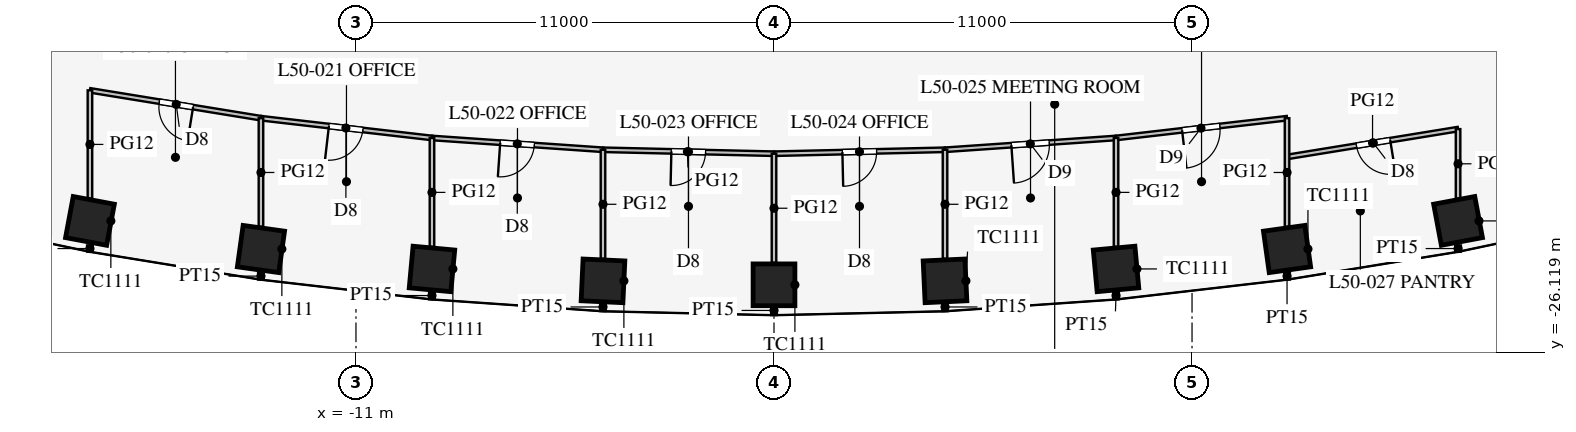
"""IFC4 building model, lengths in metres.
Left out: names, types, materials, properties, quantities, classifications, styles, units other than length and angle.
Written with IfcOpenShell. Run it as: python <this file> out.ifc"""

import sys

from ifc_helpers import new_model, si_unit, direction, frame, frame_2d, origin, origin_2d, place, context, subcontext, project, spatial, rectangle, extrude, element, fill, save


model = new_model("IFC4")
c1 = context("Model", 3, precision=1e-05, world=origin(), true_north=direction((0.0, 1.0)))
c2 = subcontext(c1, "Body", "Model", "MODEL_VIEW")
j1 = project(units=[si_unit("LENGTHUNIT", "METRE"), si_unit("PLANEANGLEUNIT", "RADIAN")], contexts=[c1])
p1 = place(None, origin())
s1 = spatial("IfcSite", under=j1, at=p1, CompositionType="ELEMENT")
p2 = place(p1, origin())
s2 = spatial("IfcBuilding", under=s1, at=p2, CompositionType="ELEMENT")
p3 = place(p2, frame((0.0, 0.0, 219.1)))
s3 = spatial("IfcBuildingStorey", under=s2, at=p3, CompositionType="ELEMENT", Elevation=219.1)
for number, where, z_axis, x_axis in (
    (1, (-18.0, -22.669, 0.0), (0.0, 0.0, 1.0), (0.983, -0.184, 0.0)),
    (2, (-13.5, -23.408, 0.0), (0.0, 0.0, 1.0), (0.99, -0.138, 0.0)),
    (3, (-9.0, -23.933, 0.0), (0.0, 0.0, 1.0), (0.996, -0.092, 0.0)),
    (4, (-4.5, -24.246, 0.0), (0.0, 0.0, 1.0), (0.999, -0.046, 0.0)),
    (5, (0.0, -24.351, 0.0), (0.0, 0.0, 1.0), (1.0, 0.0, 0.0)),
    (6, (4.5, -24.246, 0.0), (0.0, 0.0, 1.0), (0.999, 0.046, 0.0)),
    (7, (9.0, -23.933, 0.0), (0.0, 0.0, 1.0), (0.996, 0.092, 0.0)),
    (8, (13.5, -23.408, 0.0), (0.0, 0.0, 1.0), (0.99, 0.138, 0.0)),
    (9, (18.0, -22.669, 0.0), (0.0, 0.0, 1.0), (0.983, 0.184, 0.0)),
):
    element("IfcColumn", number, at=place(p3, frame(where, z_axis=z_axis, x_axis=x_axis)), inside=s3, PredefinedType="COLUMN", context=c2, shape_type="SweptSolid", body=[
        extrude(rectangle(XDim=1.1, YDim=1.1, at=origin_2d()), origin(), (0.0, 0.0, 1.0), 4.2),
    ])
p4 = place(p3, frame((13.5, -24.033, 0.0), z_axis=(0.0, 0.0, 1.0), x_axis=(0.0, -1.0, 0.0)))
e10 = element("IfcWall", 10, at=p4, inside=s3, PredefinedType="PARTITIONING", context=c2, shape_type="SweptSolid", body=[
    extrude(rectangle(XDim=0.178, YDim=0.15, at=frame_2d((0.089, 0.0))), origin(), (0.0, 0.0, 1.0), 2.9),
])
p5 = place(p3, frame((18.0, -23.315, 0.0), z_axis=(0.0, 0.0, 1.0), x_axis=(0.0, -1.0, 0.0)))
e11 = element("IfcWall", 11, at=p5, inside=s3, PredefinedType="PARTITIONING", context=c2, shape_type="SweptSolid", body=[
    extrude(rectangle(XDim=0.163, YDim=0.15, at=frame_2d((0.082, 0.0))), origin(), (0.0, 0.0, 1.0), 2.9),
])
p6 = place(p3, frame((4.5, -24.825, 0.0), z_axis=(0.0, 0.0, 1.0), x_axis=(0.0, -1.0, 0.0)))
e12 = element("IfcWall", 12, at=p6, inside=s3, PredefinedType="PARTITIONING", context=c2, shape_type="SweptSolid", body=[
    extrude(rectangle(XDim=0.217, YDim=0.15, at=frame_2d((0.108, 0.0))), origin(), (0.0, 0.0, 1.0), 2.9),
])
p7 = place(p3, frame((9.0, -24.535, 0.0), z_axis=(0.0, 0.0, 1.0), x_axis=(0.0, -1.0, 0.0)))
e13 = element("IfcWall", 13, at=p7, inside=s3, PredefinedType="PARTITIONING", context=c2, shape_type="SweptSolid", body=[
    extrude(rectangle(XDim=0.196, YDim=0.15, at=frame_2d((0.098, 0.0))), origin(), (0.0, 0.0, 1.0), 2.9),
])
p8 = place(p3, frame((0.0, -24.905, 0.0), z_axis=(0.0, 0.0, 1.0), x_axis=(0.0, -1.0, 0.0)))
e14 = element("IfcWall", 14, at=p8, inside=s3, PredefinedType="PARTITIONING", context=c2, shape_type="SweptSolid", body=[
    extrude(rectangle(XDim=0.241, YDim=0.15, at=frame_2d((0.121, 0.0))), origin(), (0.0, 0.0, 1.0), 2.9),
])
p9 = place(p3, frame((-13.5, -24.033, 0.0), z_axis=(0.0, 0.0, 1.0), x_axis=(0.0, -1.0, 0.0)))
e15 = element("IfcWall", 15, at=p9, inside=s3, PredefinedType="PARTITIONING", context=c2, shape_type="SweptSolid", body=[
    extrude(rectangle(XDim=0.178, YDim=0.15, at=frame_2d((0.089, 0.0))), origin(), (0.0, 0.0, 1.0), 2.9),
])
p10 = place(p3, frame((-18.0, -23.315, 0.0), z_axis=(0.0, 0.0, 1.0), x_axis=(0.0, -1.0, 0.0)))
e16 = element("IfcWall", 16, at=p10, inside=s3, PredefinedType="PARTITIONING", context=c2, shape_type="SweptSolid", body=[
    extrude(rectangle(XDim=0.163, YDim=0.15, at=frame_2d((0.082, 0.0))), origin(), (0.0, 0.0, 1.0), 2.9),
])
p11 = place(p3, frame((-4.5, -24.825, 0.0), z_axis=(0.0, 0.0, 1.0), x_axis=(0.0, -1.0, 0.0)))
e17 = element("IfcWall", 17, at=p11, inside=s3, PredefinedType="PARTITIONING", context=c2, shape_type="SweptSolid", body=[
    extrude(rectangle(XDim=0.217, YDim=0.15, at=frame_2d((0.108, 0.0))), origin(), (0.0, 0.0, 1.0), 2.9),
])
p12 = place(p3, frame((-9.0, -24.535, 0.0), z_axis=(0.0, 0.0, 1.0), x_axis=(0.0, -1.0, 0.0)))
e18 = element("IfcWall", 18, at=p12, inside=s3, PredefinedType="PARTITIONING", context=c2, shape_type="SweptSolid", body=[
    extrude(rectangle(XDim=0.196, YDim=0.15, at=frame_2d((0.098, 0.0))), origin(), (0.0, 0.0, 1.0), 2.9),
])
p13 = place(p3, frame((0.0, -20.901, 0.0), z_axis=(0.0, 0.0, 1.0), x_axis=(0.99973552509, 0.022997388381, 0.0)))
e19 = element("IfcWall", 19, at=p13, inside=s3, PredefinedType="PARTITIONING", context=c2, shape_type="SweptSolid", body=[
    extrude(rectangle(XDim=4.501, YDim=0.12, at=frame_2d((2.25, 0.0))), origin(), (0.0, 0.0, 1.0), 2.9),
])
p14 = place(p13, frame((1.8, 0.0, 0.15)))
e20 = element("IfcOpeningElement", 20, at=p14, cuts=e19, PredefinedType="OPENING", context=c2, shape_type="SweptSolid", body=[
    extrude(rectangle(XDim=0.9, YDim=2.1, at=frame_2d((0.45, 1.05))), frame((0.0, 0.07, 0.0), z_axis=(0.0, -1.0, 0.0), x_axis=(1.0, 0.0, 0.0)), (0.0, 0.0, 1.0), 0.14),
])
p15 = place(p3, frame((13.5, -20.986, 0.0), z_axis=(0.0, 0.0, 1.0), x_axis=(0.986986525477, 0.160802980469, 0.0)))
e21 = element("IfcWall", 21, at=p15, inside=s3, PredefinedType="PARTITIONING", context=c2, shape_type="SweptSolid", body=[
    extrude(rectangle(XDim=4.559, YDim=0.12, at=frame_2d((2.28, 0.0))), origin(), (0.0, 0.0, 1.0), 2.9),
])
p16 = place(p15, frame((1.85, 0.0, 0.15)))
e22 = element("IfcOpeningElement", 22, at=p16, cuts=e21, PredefinedType="OPENING", context=c2, shape_type="SweptSolid", body=[
    extrude(rectangle(XDim=0.9, YDim=2.1, at=frame_2d((0.45, 1.05))), frame((0.0, 0.07, 0.0), z_axis=(0.0, -1.0, 0.0), x_axis=(1.0, 0.0, 0.0)), (0.0, 0.0, 1.0), 0.14),
])
p17 = place(p3, frame((4.5, -20.797, 0.0), z_axis=(0.0, 0.0, 1.0), x_axis=(0.997623533978, 0.068900540297, 0.0)))
e23 = element("IfcWall", 23, at=p17, inside=s3, PredefinedType="PARTITIONING", context=c2, shape_type="SweptSolid", body=[
    extrude(rectangle(XDim=4.511, YDim=0.12, at=frame_2d((2.255, 0.0))), origin(), (0.0, 0.0, 1.0), 2.9),
])
p18 = place(p17, frame((1.75, 0.0, 0.15)))
e24 = element("IfcOpeningElement", 24, at=p18, cuts=e23, PredefinedType="OPENING", context=c2, shape_type="SweptSolid", body=[
    extrude(rectangle(XDim=1.0, YDim=2.1, at=frame_2d((0.5, 1.05))), frame((0.0, 0.07, 0.0), z_axis=(0.0, -1.0, 0.0), x_axis=(1.0, 0.0, 0.0)), (0.0, 0.0, 1.0), 0.14),
])
p19 = place(p3, frame((9.0, -20.486, 0.0), z_axis=(0.0, 0.0, 1.0), x_axis=(0.993382946625, 0.114849124309, 0.0)))
e25 = element("IfcWall", 25, at=p19, inside=s3, PredefinedType="PARTITIONING", context=c2, shape_type="SweptSolid", body=[
    extrude(rectangle(XDim=4.53, YDim=0.12, at=frame_2d((2.265, 0.0))), origin(), (0.0, 0.0, 1.0), 2.9),
])
p20 = place(p19, frame((1.75, 0.0, 0.15)))
e26 = element("IfcOpeningElement", 26, at=p20, cuts=e25, PredefinedType="OPENING", context=c2, shape_type="SweptSolid", body=[
    extrude(rectangle(XDim=1.0, YDim=2.1, at=frame_2d((0.5, 1.05))), frame((0.0, 0.07, 0.0), z_axis=(0.0, -1.0, 0.0), x_axis=(1.0, 0.0, 0.0)), (0.0, 0.0, 1.0), 0.14),
])
p21 = place(p3, frame((-13.5, -19.966, 0.0), z_axis=(0.0, 0.0, 1.0), x_axis=(0.993382946625, -0.114849124309, 0.0)))
e27 = element("IfcWall", 27, at=p21, inside=s3, PredefinedType="PARTITIONING", context=c2, shape_type="SweptSolid", body=[
    extrude(rectangle(XDim=4.53, YDim=0.12, at=frame_2d((2.265, 0.0))), origin(), (0.0, 0.0, 1.0), 2.9),
])
p22 = place(p21, frame((1.8, 0.0, 0.15)))
e28 = element("IfcOpeningElement", 28, at=p22, cuts=e27, PredefinedType="OPENING", context=c2, shape_type="SweptSolid", body=[
    extrude(rectangle(XDim=0.9, YDim=2.1, at=frame_2d((0.45, 1.05))), frame((0.0, 0.07, 0.0), z_axis=(0.0, -1.0, 0.0), x_axis=(1.0, 0.0, 0.0)), (0.0, 0.0, 1.0), 0.14),
])
p23 = place(p3, frame((-18.0, -19.233, 0.0), z_axis=(0.0, 0.0, 1.0), x_axis=(0.986986525477, -0.160802980469, 0.0)))
e29 = element("IfcWall", 29, at=p23, inside=s3, PredefinedType="PARTITIONING", context=c2, shape_type="SweptSolid", body=[
    extrude(rectangle(XDim=4.559, YDim=0.12, at=frame_2d((2.28, 0.0))), origin(), (0.0, 0.0, 1.0), 2.9),
])
p24 = place(p23, frame((1.85, 0.0, 0.15)))
e30 = element("IfcOpeningElement", 30, at=p24, cuts=e29, PredefinedType="OPENING", context=c2, shape_type="SweptSolid", body=[
    extrude(rectangle(XDim=0.9, YDim=2.1, at=frame_2d((0.45, 1.05))), frame((0.0, 0.07, 0.0), z_axis=(0.0, -1.0, 0.0), x_axis=(1.0, 0.0, 0.0)), (0.0, 0.0, 1.0), 0.14),
])
p25 = place(p3, frame((-4.5, -20.797, 0.0), z_axis=(0.0, 0.0, 1.0), x_axis=(0.99973552509, -0.022997388381, 0.0)))
e31 = element("IfcWall", 31, at=p25, inside=s3, PredefinedType="PARTITIONING", context=c2, shape_type="SweptSolid", body=[
    extrude(rectangle(XDim=4.501, YDim=0.12, at=frame_2d((2.25, 0.0))), origin(), (0.0, 0.0, 1.0), 2.9),
])
p26 = place(p25, frame((1.8, 0.0, 0.15)))
e32 = element("IfcOpeningElement", 32, at=p26, cuts=e31, PredefinedType="OPENING", context=c2, shape_type="SweptSolid", body=[
    extrude(rectangle(XDim=0.9, YDim=2.1, at=frame_2d((0.45, 1.05))), frame((0.0, 0.07, 0.0), z_axis=(0.0, -1.0, 0.0), x_axis=(1.0, 0.0, 0.0)), (0.0, 0.0, 1.0), 0.14),
])
p27 = place(p3, frame((-9.0, -20.486, 0.0), z_axis=(0.0, 0.0, 1.0), x_axis=(0.997623533978, -0.068900540297, 0.0)))
e33 = element("IfcWall", 33, at=p27, inside=s3, PredefinedType="PARTITIONING", context=c2, shape_type="SweptSolid", body=[
    extrude(rectangle(XDim=4.511, YDim=0.12, at=frame_2d((2.255, 0.0))), origin(), (0.0, 0.0, 1.0), 2.9),
])
p28 = place(p27, frame((1.8, 0.0, 0.15)))
e34 = element("IfcOpeningElement", 34, at=p28, cuts=e33, PredefinedType="OPENING", context=c2, shape_type="SweptSolid", body=[
    extrude(rectangle(XDim=0.9, YDim=2.1, at=frame_2d((0.45, 1.05))), frame((0.0, 0.07, 0.0), z_axis=(0.0, -1.0, 0.0), x_axis=(1.0, 0.0, 0.0)), (0.0, 0.0, 1.0), 0.14),
])
p29 = place(p3, frame((0.0, -20.901, 0.0), z_axis=(0.0, 0.0, 1.0), x_axis=(0.0, -1.0, 0.0)))
e35 = element("IfcWall", 35, at=p29, inside=s3, PredefinedType="PARTITIONING", context=c2, shape_type="SweptSolid", body=[
    extrude(rectangle(XDim=2.87, YDim=0.12, at=frame_2d((1.435, 0.0))), origin(), (0.0, 0.0, 1.0), 2.9),
])
p30 = place(p3, frame((13.5, -19.966, 0.0), z_axis=(0.0, 0.0, 1.0), x_axis=(0.0, -1.0, 0.0)))
e36 = element("IfcWall", 36, at=p30, inside=s3, PredefinedType="PARTITIONING", context=c2, shape_type="SweptSolid", body=[
    extrude(rectangle(XDim=2.857, YDim=0.12, at=frame_2d((1.428, 0.0))), origin(), (0.0, 0.0, 1.0), 2.9),
])
p31 = place(p3, frame((18.0, -20.253, 0.0), z_axis=(0.0, 0.0, 1.0), x_axis=(0.0, -1.0, 0.0)))
e37 = element("IfcWall", 37, at=p31, inside=s3, PredefinedType="PARTITIONING", context=c2, shape_type="SweptSolid", body=[
    extrude(rectangle(XDim=1.826, YDim=0.12, at=frame_2d((0.913, 0.0))), origin(), (0.0, 0.0, 1.0), 2.9),
])
p32 = place(p3, frame((4.5, -20.797, 0.0), z_axis=(0.0, 0.0, 1.0), x_axis=(0.0, -1.0, 0.0)))
e38 = element("IfcWall", 38, at=p32, inside=s3, PredefinedType="PARTITIONING", context=c2, shape_type="SweptSolid", body=[
    extrude(rectangle(XDim=2.869, YDim=0.12, at=frame_2d((1.434, 0.0))), origin(), (0.0, 0.0, 1.0), 2.9),
])
p33 = place(p3, frame((9.0, -20.486, 0.0), z_axis=(0.0, 0.0, 1.0), x_axis=(0.0, -1.0, 0.0)))
e39 = element("IfcWall", 39, at=p33, inside=s3, PredefinedType="PARTITIONING", context=c2, shape_type="SweptSolid", body=[
    extrude(rectangle(XDim=2.864, YDim=0.12, at=frame_2d((1.432, 0.0))), origin(), (0.0, 0.0, 1.0), 2.9),
])
p34 = place(p3, frame((-13.5, -19.966, 0.0), z_axis=(0.0, 0.0, 1.0), x_axis=(0.0, -1.0, 0.0)))
e40 = element("IfcWall", 40, at=p34, inside=s3, PredefinedType="PARTITIONING", context=c2, shape_type="SweptSolid", body=[
    extrude(rectangle(XDim=2.857, YDim=0.12, at=frame_2d((1.428, 0.0))), origin(), (0.0, 0.0, 1.0), 2.9),
])
p35 = place(p3, frame((-18.0, -19.233, 0.0), z_axis=(0.0, 0.0, 1.0), x_axis=(0.0, -1.0, 0.0)))
e41 = element("IfcWall", 41, at=p35, inside=s3, PredefinedType="PARTITIONING", context=c2, shape_type="SweptSolid", body=[
    extrude(rectangle(XDim=2.846, YDim=0.12, at=frame_2d((1.423, 0.0))), origin(), (0.0, 0.0, 1.0), 2.9),
])
p36 = place(p3, frame((-4.5, -20.797, 0.0), z_axis=(0.0, 0.0, 1.0), x_axis=(0.0, -1.0, 0.0)))
e42 = element("IfcWall", 42, at=p36, inside=s3, PredefinedType="PARTITIONING", context=c2, shape_type="SweptSolid", body=[
    extrude(rectangle(XDim=2.869, YDim=0.12, at=frame_2d((1.434, 0.0))), origin(), (0.0, 0.0, 1.0), 2.9),
])
p37 = place(p3, frame((-9.0, -20.486, 0.0), z_axis=(0.0, 0.0, 1.0), x_axis=(0.0, -1.0, 0.0)))
e43 = element("IfcWall", 43, at=p37, inside=s3, PredefinedType="PARTITIONING", context=c2, shape_type="SweptSolid", body=[
    extrude(rectangle(XDim=2.864, YDim=0.12, at=frame_2d((1.432, 0.0))), origin(), (0.0, 0.0, 1.0), 2.9),
])
p38 = place(p24, frame((0.9, 0.0, 0.0), z_axis=(0.0, 0.0, 1.0), x_axis=(-1.0, 0.0, 0.0)))
e44 = element("IfcDoor", 44, at=p38, inside=s3, OperationType="SINGLE_SWING_LEFT", PredefinedType="DOOR", context=c2, shape_type="SweptSolid", body=[
    extrude(rectangle(XDim=0.9, YDim=2.1, at=frame_2d((0.45, 1.05))), frame((0.0, 0.025, 0.0), z_axis=(0.0, -1.0, 0.0), x_axis=(1.0, 0.0, 0.0)), (0.0, 0.0, 1.0), 0.05),
])
fill(e30, e44)
p39 = place(p22, frame((0.9, 0.0, 0.0), z_axis=(0.0, 0.0, 1.0), x_axis=(-1.0, 0.0, 0.0)))
e45 = element("IfcDoor", 45, at=p39, inside=s3, OperationType="SINGLE_SWING_RIGHT", PredefinedType="DOOR", context=c2, shape_type="SweptSolid", body=[
    extrude(rectangle(XDim=0.9, YDim=2.1, at=frame_2d((0.45, 1.05))), frame((0.0, 0.025, 0.0), z_axis=(0.0, -1.0, 0.0), x_axis=(1.0, 0.0, 0.0)), (0.0, 0.0, 1.0), 0.05),
])
fill(e28, e45)
p40 = place(p28, frame((0.9, 0.0, 0.0), z_axis=(0.0, 0.0, 1.0), x_axis=(-1.0, 0.0, 0.0)))
e46 = element("IfcDoor", 46, at=p40, inside=s3, OperationType="SINGLE_SWING_RIGHT", PredefinedType="DOOR", context=c2, shape_type="SweptSolid", body=[
    extrude(rectangle(XDim=0.9, YDim=2.1, at=frame_2d((0.45, 1.05))), frame((0.0, 0.025, 0.0), z_axis=(0.0, -1.0, 0.0), x_axis=(1.0, 0.0, 0.0)), (0.0, 0.0, 1.0), 0.05),
])
fill(e34, e46)
p41 = place(p26, frame((0.9, 0.0, 0.0), z_axis=(0.0, 0.0, 1.0), x_axis=(-1.0, 0.0, 0.0)))
e47 = element("IfcDoor", 47, at=p41, inside=s3, OperationType="SINGLE_SWING_RIGHT", PredefinedType="DOOR", context=c2, shape_type="SweptSolid", body=[
    extrude(rectangle(XDim=0.9, YDim=2.1, at=frame_2d((0.45, 1.05))), frame((0.0, 0.025, 0.0), z_axis=(0.0, -1.0, 0.0), x_axis=(1.0, 0.0, 0.0)), (0.0, 0.0, 1.0), 0.05),
])
fill(e32, e47)
p42 = place(p14, frame((0.9, 0.0, 0.0), z_axis=(0.0, 0.0, 1.0), x_axis=(-1.0, 0.0, 0.0)))
e48 = element("IfcDoor", 48, at=p42, inside=s3, OperationType="SINGLE_SWING_RIGHT", PredefinedType="DOOR", context=c2, shape_type="SweptSolid", body=[
    extrude(rectangle(XDim=0.9, YDim=2.1, at=frame_2d((0.45, 1.05))), frame((0.0, 0.025, 0.0), z_axis=(0.0, -1.0, 0.0), x_axis=(1.0, 0.0, 0.0)), (0.0, 0.0, 1.0), 0.05),
])
fill(e20, e48)
p43 = place(p18, frame((1.0, 0.0, 0.0), z_axis=(0.0, 0.0, 1.0), x_axis=(-1.0, 0.0, 0.0)))
e49 = element("IfcDoor", 49, at=p43, inside=s3, OperationType="SINGLE_SWING_RIGHT", PredefinedType="DOOR", context=c2, shape_type="SweptSolid", body=[
    extrude(rectangle(XDim=1.0, YDim=2.1, at=frame_2d((0.5, 1.05))), frame((0.0, 0.025, 0.0), z_axis=(0.0, -1.0, 0.0), x_axis=(1.0, 0.0, 0.0)), (0.0, 0.0, 1.0), 0.05),
])
fill(e24, e49)
p44 = place(p20, frame((1.0, 0.0, 0.0), z_axis=(0.0, 0.0, 1.0), x_axis=(-1.0, 0.0, 0.0)))
e50 = element("IfcDoor", 50, at=p44, inside=s3, OperationType="SINGLE_SWING_RIGHT", PredefinedType="DOOR", context=c2, shape_type="SweptSolid", body=[
    extrude(rectangle(XDim=1.0, YDim=2.1, at=frame_2d((0.5, 1.05))), frame((0.0, 0.025, 0.0), z_axis=(0.0, -1.0, 0.0), x_axis=(1.0, 0.0, 0.0)), (0.0, 0.0, 1.0), 0.05),
])
fill(e26, e50)
p45 = place(p16, frame((0.9, 0.0, 0.0), z_axis=(0.0, 0.0, 1.0), x_axis=(-1.0, 0.0, 0.0)))
e51 = element("IfcDoor", 51, at=p45, inside=s3, OperationType="SINGLE_SWING_LEFT", PredefinedType="DOOR", context=c2, shape_type="SweptSolid", body=[
    extrude(rectangle(XDim=0.9, YDim=2.1, at=frame_2d((0.45, 1.05))), frame((0.0, 0.025, 0.0), z_axis=(0.0, -1.0, 0.0), x_axis=(1.0, 0.0, 0.0)), (0.0, 0.0, 1.0), 0.05),
])
fill(e22, e51)
save(model, sys.argv[1])
